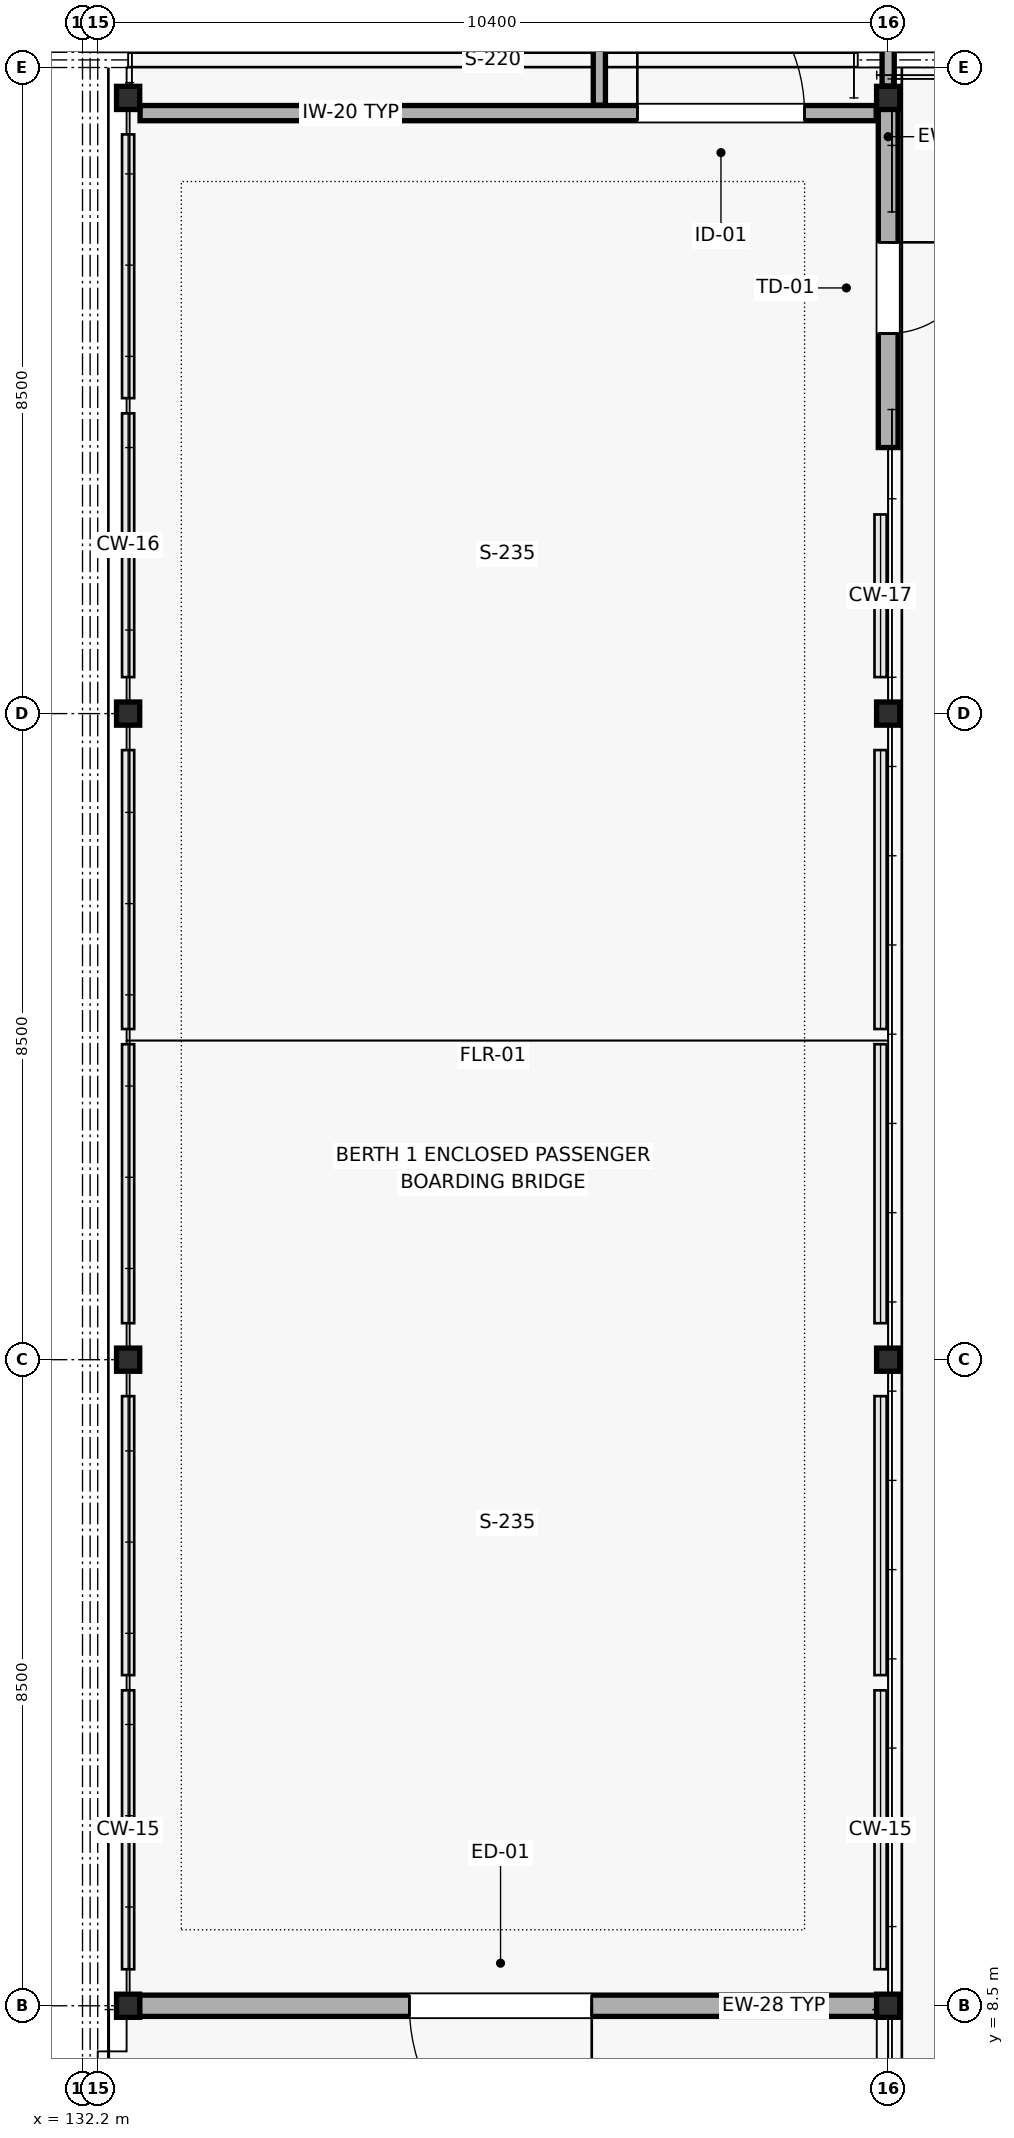
"""IFC4 building model, lengths in metres.
Left out: names, types, materials, properties, quantities, classifications, styles, units other than length and angle.
Written with IfcOpenShell. Run it as: python <this file> out.ifc"""

import sys

from ifc_helpers import new_model, si_unit, direction, frame, frame_2d, origin, origin_2d, place, context, subcontext, project, spatial, rectangle, hollow_rectangle, extrude, element, fill, save


model = new_model("IFC4")
c1 = context("Model", 3, precision=1e-05, world=origin(), true_north=direction((0.0, 1.0)))
c2 = subcontext(c1, "Body", "Model", "MODEL_VIEW")
j1 = project(units=[si_unit("LENGTHUNIT", "METRE"), si_unit("PLANEANGLEUNIT", "RADIAN")], contexts=[c1])
p1 = place(None, origin())
s1 = spatial("IfcSite", under=j1, at=p1, CompositionType="ELEMENT")
p2 = place(p1, origin())
s2 = spatial("IfcBuilding", under=s1, at=p2, CompositionType="ELEMENT")
p3 = place(p2, frame((0.0, 0.0, 5.4)))
s3 = spatial("IfcBuildingStorey", under=s2, at=p3, CompositionType="ELEMENT", Elevation=5.4)
for number, where, z_axis, x_axis in (
    (1, (132.8, 8.5, 0.0), (0.0, 0.0, 1.0), (1.0, 0.0, 0.0)),
    (2, (132.8, 17.0, 0.0), (0.0, 0.0, 1.0), (1.0, 0.0, 0.0)),
    (3, (132.8, 25.5, 0.0), (0.0, 0.0, 1.0), (1.0, 0.0, 0.0)),
    (4, (132.8, 33.6, 0.0), (0.0, 0.0, 1.0), (1.0, 0.0, 0.0)),
    (5, (142.8, 8.5, 0.0), (0.0, 0.0, 1.0), (1.0, 0.0, 0.0)),
    (6, (142.8, 17.0, 0.0), (0.0, 0.0, 1.0), (1.0, 0.0, 0.0)),
    (7, (142.8, 25.5, 0.0), (0.0, 0.0, 1.0), (1.0, 0.0, 0.0)),
    (8, (142.8, 33.6, 0.0), (0.0, 0.0, 1.0), (1.0, 0.0, 0.0)),
):
    element("IfcColumn", number, at=place(p3, frame(where, z_axis=z_axis, x_axis=x_axis)), inside=s3, PredefinedType="COLUMN", context=c2, shape_type="SweptSolid", body=[
        extrude(hollow_rectangle(XDim=0.305, YDim=0.305, WallThickness=0.012, InnerFilletRadius=0.012, OuterFilletRadius=0.024, at=origin_2d()), origin(), (0.0, 0.0, 1.0), 4.5),
    ])
p4 = place(p3, frame((132.95, 8.5, 0.0), z_axis=(0.0, 0.0, 1.0), x_axis=(1.0, 0.0, 0.0)))
e9 = element("IfcWall", 9, at=p4, inside=s3, PredefinedType="SOLIDWALL", context=c2, shape_type="SweptSolid", body=[
    extrude(rectangle(XDim=9.699, YDim=0.28, at=frame_2d((4.85, 0.0))), origin(), (0.0, 0.0, 1.0), 3.683),
])
p5 = place(p4, frame((3.55, 0.0, 0.0)))
e10 = element("IfcOpeningElement", 10, at=p5, cuts=e9, PredefinedType="OPENING", context=c2, shape_type="SweptSolid", body=[
    extrude(rectangle(XDim=2.4, YDim=2.6, at=frame_2d((1.2, 1.3))), frame((0.0, 0.15, 0.0), z_axis=(0.0, -1.0, 0.0), x_axis=(1.0, 0.0, 0.0)), (0.0, 0.0, 1.0), 0.3),
])
p6 = place(p3, frame((142.8, 29.0, 0.0), z_axis=(0.0, 0.0, 1.0), x_axis=(0.0, 1.0, 0.0)))
e11 = element("IfcWall", 11, at=p6, inside=s3, PredefinedType="SOLIDWALL", context=c2, shape_type="SweptSolid", body=[
    extrude(rectangle(XDim=4.45, YDim=0.26, at=frame_2d((2.225, 0.0))), origin(), (0.0, 0.0, 1.0), 3.747),
])
p7 = place(p6, frame((1.5, 0.0, 0.0)))
e12 = element("IfcOpeningElement", 12, at=p7, cuts=e11, PredefinedType="OPENING", context=c2, shape_type="SweptSolid", body=[
    extrude(rectangle(XDim=1.2, YDim=2.2, at=frame_2d((0.6, 1.1))), frame((0.0, 0.14, 0.0), z_axis=(0.0, -1.0, 0.0), x_axis=(1.0, 0.0, 0.0)), (0.0, 0.0, 1.0), 0.28),
])
p8 = place(p3, frame((132.958, 33.4, 0.0), z_axis=(0.0, 0.0, 1.0), x_axis=(1.0, 0.0, 0.0)))
e13 = element("IfcWall", 13, at=p8, inside=s3, PredefinedType="PARTITIONING", context=c2, shape_type="SweptSolid", body=[
    extrude(rectangle(XDim=9.685, YDim=0.2, at=frame_2d((4.843, 0.0))), origin(), (0.0, 0.0, 1.0), 4.29),
])
p9 = place(p8, frame((6.542, 0.0, 0.0)))
e14 = element("IfcOpeningElement", 14, at=p9, cuts=e13, PredefinedType="OPENING", context=c2, shape_type="SweptSolid", body=[
    extrude(rectangle(XDim=2.2, YDim=2.5, at=frame_2d((1.1, 1.25))), frame((0.0, 0.11, 0.0), z_axis=(0.0, -1.0, 0.0), x_axis=(1.0, 0.0, 0.0)), (0.0, 0.0, 1.0), 0.22),
])
p10 = place(p3, frame((139.0, 33.505, 0.0), z_axis=(0.0, 0.0, 1.0), x_axis=(0.0, 1.0, 0.0)))
e15 = element("IfcWall", 15, at=p10, inside=s3, PredefinedType="PARTITIONING", context=c2, shape_type="SweptSolid", body=[
    extrude(rectangle(XDim=31.935, YDim=0.16, at=frame_2d((15.968, 0.0))), origin(), (0.0, 0.0, 1.0), 3.683),
])
p11 = place(p10, frame((14.005, 0.0, 0.0)))
e16 = element("IfcOpeningElement", 16, at=p11, cuts=e15, PredefinedType="OPENING", context=c2, shape_type="SweptSolid", body=[
    extrude(rectangle(XDim=2.2, YDim=2.5, at=frame_2d((1.1, 1.25))), frame((0.0, 0.09, 0.0), z_axis=(0.0, -1.0, 0.0), x_axis=(1.0, 0.0, 0.0)), (0.0, 0.0, 1.0), 0.18),
])
p12 = place(p3, frame((142.8, 33.757, 0.0), z_axis=(0.0, 0.0, 1.0), x_axis=(0.0, 1.0, 0.0)))
e17 = element("IfcWall", 17, at=p12, inside=s3, PredefinedType="PARTITIONING", context=c2, shape_type="SweptSolid", body=[
    extrude(rectangle(XDim=28.565, YDim=0.16, at=frame_2d((14.283, 0.0))), origin(), (0.0, 0.0, 1.0), 3.747),
])
p13 = place(p12, frame((16.042, 0.0, 0.0)))
e18 = element("IfcOpeningElement", 18, at=p13, cuts=e17, PredefinedType="OPENING", context=c2, shape_type="SweptSolid", body=[
    extrude(rectangle(XDim=2.2, YDim=2.5, at=frame_2d((1.1, 1.25))), frame((0.0, 0.09, 0.0), z_axis=(0.0, -1.0, 0.0), x_axis=(1.0, 0.0, 0.0)), (0.0, 0.0, 1.0), 0.18),
])
p14 = place(p5, frame((2.4, 0.0, 0.0), z_axis=(0.0, 0.0, 1.0), x_axis=(-1.0, 0.0, 0.0)))
e19 = element("IfcDoor", 19, at=p14, inside=s3, OperationType="SINGLE_SWING_LEFT", PredefinedType="DOOR", context=c2, shape_type="SweptSolid", body=[
    extrude(rectangle(XDim=2.4, YDim=2.6, at=frame_2d((1.2, 1.3))), frame((0.0, 0.025, 0.0), z_axis=(0.0, -1.0, 0.0), x_axis=(1.0, 0.0, 0.0)), (0.0, 0.0, 1.0), 0.05),
])
fill(e10, e19)
p15 = place(p7, frame((1.2, 0.0, 0.0), z_axis=(0.0, 0.0, 1.0), x_axis=(-1.0, 0.0, 0.0)))
e20 = element("IfcDoor", 20, at=p15, inside=s3, OperationType="SINGLE_SWING_LEFT", PredefinedType="DOOR", context=c2, shape_type="SweptSolid", body=[
    extrude(rectangle(XDim=1.2, YDim=2.2, at=frame_2d((0.6, 1.1))), frame((0.0, 0.025, 0.0), z_axis=(0.0, -1.0, 0.0), x_axis=(1.0, 0.0, 0.0)), (0.0, 0.0, 1.0), 0.05),
])
fill(e12, e20)
p16 = place(p9, origin())
e21 = element("IfcDoor", 21, at=p16, inside=s3, OperationType="SINGLE_SWING_LEFT", PredefinedType="DOOR", context=c2, shape_type="SweptSolid", body=[
    extrude(rectangle(XDim=2.2, YDim=2.5, at=frame_2d((1.1, 1.25))), frame((0.0, 0.025, 0.0), z_axis=(0.0, -1.0, 0.0), x_axis=(1.0, 0.0, 0.0)), (0.0, 0.0, 1.0), 0.05),
])
fill(e14, e21)
save(model, sys.argv[1])
